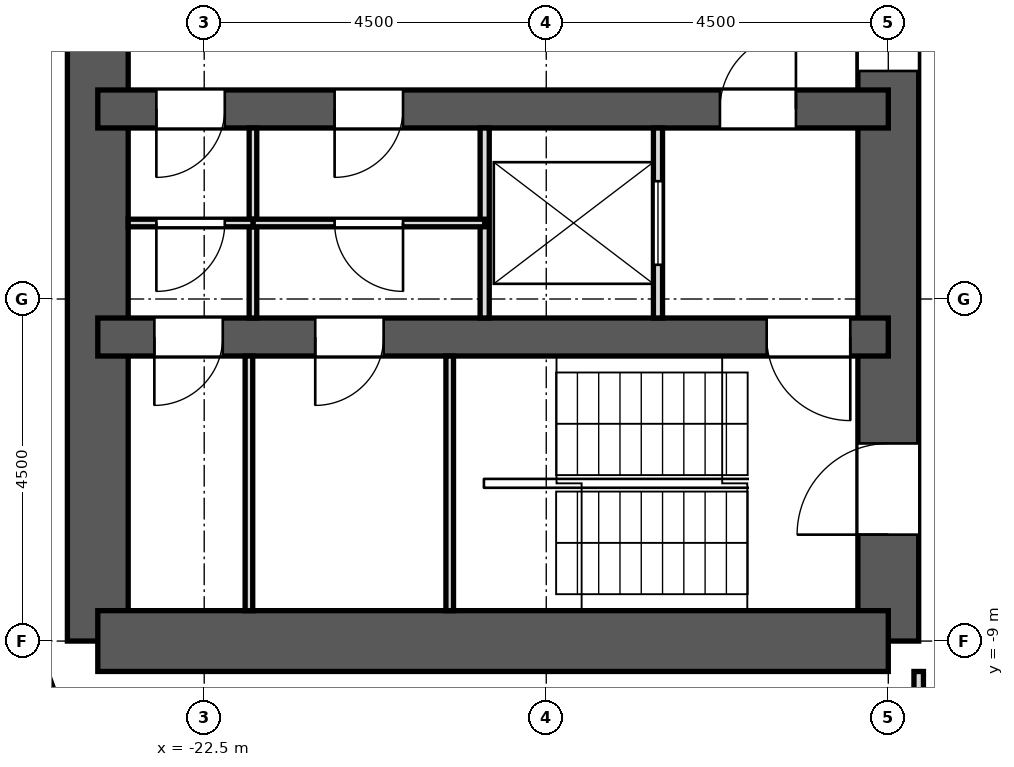
"""IFC4 building model, lengths in metres.
Left out: names, types, materials, properties, quantities, classifications, styles, units other than length and angle.
Written with IfcOpenShell. Run it as: python <this file> out.ifc"""

import sys

from ifc_helpers import new_model, si_unit, direction, frame, frame_2d, origin, place, context, subcontext, project, spatial, rectangle, extrude, element, fill, save


model = new_model("IFC4")
c1 = context("Model", 3, precision=1e-05, world=origin(), true_north=direction((0.0, 1.0)))
c2 = subcontext(c1, "Body", "Model", "MODEL_VIEW")
j1 = project(units=[si_unit("LENGTHUNIT", "METRE"), si_unit("PLANEANGLEUNIT", "RADIAN")], contexts=[c1])
p1 = place(None, origin())
s1 = spatial("IfcSite", under=j1, at=p1, CompositionType="ELEMENT")
p2 = place(p1, origin())
s2 = spatial("IfcBuilding", under=s1, at=p2, CompositionType="ELEMENT")
p3 = place(p2, frame((0.0, 0.0, 131.5)))
s3 = spatial("IfcBuildingStorey", under=s2, at=p3, CompositionType="ELEMENT", Elevation=131.5)
p4 = place(p3, frame((-13.5, -9.0, 0.0), z_axis=(0.0, 0.0, 1.0), x_axis=(0.0, 1.0, 0.0)))
e1 = element("IfcWall", 1, at=p4, inside=s3, PredefinedType="SHEAR", context=c2, shape_type="SweptSolid", body=[
    extrude(rectangle(XDim=18.0, YDim=0.8, at=frame_2d((9.0, 0.0))), origin(), (0.0, 0.0, 1.0), 3.3),
])
p5 = place(p4, frame((15.4, 0.0, 0.0)))
e2 = element("IfcOpeningElement", 2, at=p5, cuts=e1, PredefinedType="OPENING", context=c2, shape_type="SweptSolid", body=[
    extrude(rectangle(XDim=1.2, YDim=2.1, at=frame_2d((0.6, 1.05))), frame((0.0, 0.412, 0.0), z_axis=(0.0, -1.0, 0.0), x_axis=(1.0, 0.0, 0.0)), (0.0, 0.0, 1.0), 0.824),
])
p6 = place(p4, frame((1.4, 0.0, 0.0)))
e3 = element("IfcOpeningElement", 3, at=p6, cuts=e1, PredefinedType="OPENING", context=c2, shape_type="SweptSolid", body=[
    extrude(rectangle(XDim=1.2, YDim=2.1, at=frame_2d((0.6, 1.05))), frame((0.0, 0.412, 0.0), z_axis=(0.0, -1.0, 0.0), x_axis=(1.0, 0.0, 0.0)), (0.0, 0.0, 1.0), 0.824),
])
p7 = place(p4, frame((7.5, 0.0, 0.0)))
e4 = element("IfcOpeningElement", 4, at=p7, cuts=e1, PredefinedType="OPENING", context=c2, shape_type="SweptSolid", body=[
    extrude(rectangle(XDim=3.0, YDim=2.4, at=frame_2d((1.5, 1.2))), frame((0.0, 0.412, 0.0), z_axis=(0.0, -1.0, 0.0), x_axis=(1.0, 0.0, 0.0)), (0.0, 0.0, 1.0), 0.824),
])
p8 = place(p3, frame((-23.9, -9.0, 0.0), z_axis=(0.0, 0.0, 1.0), x_axis=(0.0, 1.0, 0.0)))
e5 = element("IfcWall", 5, at=p8, inside=s3, PredefinedType="SHEAR", context=c2, shape_type="SweptSolid", body=[
    extrude(rectangle(XDim=18.0, YDim=0.8, at=frame_2d((9.0, 0.0))), origin(), (0.0, 0.0, 1.0), 3.3),
])
p9 = place(p3, frame((-13.5, -9.0, 0.0), z_axis=(0.0, 0.0, 1.0), x_axis=(-1.0, 0.0, 0.0)))
e6 = element("IfcWall", 6, at=p9, inside=s3, PredefinedType="SHEAR", context=c2, shape_type="SweptSolid", body=[
    extrude(rectangle(XDim=10.4, YDim=0.8, at=frame_2d((5.2, 0.0))), origin(), (0.0, 0.0, 1.0), 3.3),
])
p10 = place(p3, frame((-13.5, -5.0, 0.0), z_axis=(0.0, 0.0, 1.0), x_axis=(-1.0, 0.0, 0.0)))
e7 = element("IfcWall", 7, at=p10, inside=s3, PredefinedType="SHEAR", context=c2, shape_type="SweptSolid", body=[
    extrude(rectangle(XDim=10.4, YDim=0.5, at=frame_2d((5.2, 0.0))), origin(), (0.0, 0.0, 1.0), 3.3),
])
p11 = place(p10, frame((6.639, 0.0, 0.0)))
e8 = element("IfcOpeningElement", 8, at=p11, cuts=e7, PredefinedType="OPENING", context=c2, shape_type="SweptSolid", body=[
    extrude(rectangle(XDim=0.9, YDim=2.1, at=frame_2d((0.45, 1.05))), frame((0.0, 0.262, 0.0), z_axis=(0.0, -1.0, 0.0), x_axis=(1.0, 0.0, 0.0)), (0.0, 0.0, 1.0), 0.524),
])
p12 = place(p10, frame((8.756, 0.0, 0.0)))
e9 = element("IfcOpeningElement", 9, at=p12, cuts=e7, PredefinedType="OPENING", context=c2, shape_type="SweptSolid", body=[
    extrude(rectangle(XDim=0.9, YDim=2.1, at=frame_2d((0.45, 1.05))), frame((0.0, 0.262, 0.0), z_axis=(0.0, -1.0, 0.0), x_axis=(1.0, 0.0, 0.0)), (0.0, 0.0, 1.0), 0.524),
])
p13 = place(p10, frame((0.5, 0.0, 0.0)))
e10 = element("IfcOpeningElement", 10, at=p13, cuts=e7, PredefinedType="OPENING", context=c2, shape_type="SweptSolid", body=[
    extrude(rectangle(XDim=1.1, YDim=2.1, at=frame_2d((0.55, 1.05))), frame((0.0, 0.262, 0.0), z_axis=(0.0, -1.0, 0.0), x_axis=(1.0, 0.0, 0.0)), (0.0, 0.0, 1.0), 0.524),
])
p14 = place(p3, frame((-13.5, -2.0, 0.0), z_axis=(0.0, 0.0, 1.0), x_axis=(-1.0, 0.0, 0.0)))
e11 = element("IfcWall", 11, at=p14, inside=s3, PredefinedType="SHEAR", context=c2, shape_type="SweptSolid", body=[
    extrude(rectangle(XDim=10.4, YDim=0.5, at=frame_2d((5.2, 0.0))), origin(), (0.0, 0.0, 1.0), 3.3),
])
p15 = place(p14, frame((1.215, 0.0, 0.0)))
e12 = element("IfcOpeningElement", 12, at=p15, cuts=e11, PredefinedType="OPENING", context=c2, shape_type="SweptSolid", body=[
    extrude(rectangle(XDim=1.0, YDim=2.1, at=frame_2d((0.5, 1.05))), frame((0.0, 0.262, 0.0), z_axis=(0.0, -1.0, 0.0), x_axis=(1.0, 0.0, 0.0)), (0.0, 0.0, 1.0), 0.524),
])
p16 = place(p14, frame((6.384, 0.0, 0.0)))
e13 = element("IfcOpeningElement", 13, at=p16, cuts=e11, PredefinedType="OPENING", context=c2, shape_type="SweptSolid", body=[
    extrude(rectangle(XDim=0.9, YDim=2.1, at=frame_2d((0.45, 1.05))), frame((0.0, 0.262, 0.0), z_axis=(0.0, -1.0, 0.0), x_axis=(1.0, 0.0, 0.0)), (0.0, 0.0, 1.0), 0.524),
])
p17 = place(p14, frame((8.729, 0.0, 0.0)))
e14 = element("IfcOpeningElement", 14, at=p17, cuts=e11, PredefinedType="OPENING", context=c2, shape_type="SweptSolid", body=[
    extrude(rectangle(XDim=0.9, YDim=2.1, at=frame_2d((0.45, 1.05))), frame((0.0, 0.262, 0.0), z_axis=(0.0, -1.0, 0.0), x_axis=(1.0, 0.0, 0.0)), (0.0, 0.0, 1.0), 0.524),
])
p18 = place(p3, frame((-25.617, -7.383, 0.0), z_axis=(0.0, 0.0, 1.0), x_axis=(0.341990236633, -0.939703505393, 0.0)))
e15 = element("IfcWall", 15, at=p18, inside=s3, PredefinedType="SOLIDWALL", context=c2, shape_type="SweptSolid", body=[
    extrude(rectangle(XDim=3.648, YDim=0.6, at=frame_2d((1.824, 0.0))), origin(), (0.0, 0.0, 1.0), 2.8),
])
p19 = place(p3, frame((-13.1, -13.037, 0.0), z_axis=(0.0, 0.0, 1.0), x_axis=(0.0, 1.0, 0.0)))
e16 = element("IfcWall", 16, at=p19, inside=s3, PredefinedType="PARTITIONING", context=c2, shape_type="SweptSolid", body=[
    extrude(rectangle(XDim=3.637, YDim=0.125, at=frame_2d((1.818, 0.0))), origin(), (0.0, 0.0, 1.0), 2.8),
])
p20 = place(p3, frame((-16.53, -4.75, 0.0), z_axis=(0.0, 0.0, 1.0), x_axis=(0.0, 1.0, 0.0)))
e17 = element("IfcWall", 17, at=p20, inside=s3, PredefinedType="PARTITIONING", context=c2, shape_type="SweptSolid", body=[
    extrude(rectangle(XDim=2.5, YDim=0.12, at=frame_2d((1.25, 0.0))), origin(), (0.0, 0.0, 1.0), 2.8),
])
p21 = place(p20, frame((0.7, 0.0, 0.0)))
e18 = element("IfcOpeningElement", 18, at=p21, cuts=e17, PredefinedType="OPENING", context=c2, shape_type="SweptSolid", body=[
    extrude(rectangle(XDim=1.1, YDim=2.1, at=frame_2d((0.55, 1.05))), frame((0.0, 0.072, 0.0), z_axis=(0.0, -1.0, 0.0), x_axis=(1.0, 0.0, 0.0)), (0.0, 0.0, 1.0), 0.144),
])
p22 = place(p3, frame((-18.81, -4.75, 0.0), z_axis=(0.0, 0.0, 1.0), x_axis=(0.0, 1.0, 0.0)))
e19 = element("IfcWall", 19, at=p22, inside=s3, PredefinedType="PARTITIONING", context=c2, shape_type="SweptSolid", body=[
    extrude(rectangle(XDim=2.5, YDim=0.12, at=frame_2d((1.25, 0.0))), origin(), (0.0, 0.0, 1.0), 2.8),
])
p23 = place(p3, frame((-21.858, -4.75, 0.0), z_axis=(0.0, 0.0, 1.0), x_axis=(0.0, 1.0, 0.0)))
e20 = element("IfcWall", 20, at=p23, inside=s3, PredefinedType="PARTITIONING", context=c2, shape_type="SweptSolid", body=[
    extrude(rectangle(XDim=2.5, YDim=0.1, at=frame_2d((1.25, 0.0))), origin(), (0.0, 0.0, 1.0), 2.8),
])
p24 = place(p3, frame((-18.81, -3.5, 0.0), z_axis=(0.0, 0.0, 1.0), x_axis=(-1.0, 0.0, 0.0)))
e21 = element("IfcWall", 21, at=p24, inside=s3, PredefinedType="PARTITIONING", context=c2, shape_type="SweptSolid", body=[
    extrude(rectangle(XDim=3.048, YDim=0.1, at=frame_2d((1.524, 0.0))), origin(), (0.0, 0.0, 1.0), 2.8),
])
p25 = place(p24, frame((1.074, 0.0, 0.0)))
e22 = element("IfcOpeningElement", 22, at=p25, cuts=e21, PredefinedType="OPENING", context=c2, shape_type="SweptSolid", body=[
    extrude(rectangle(XDim=0.9, YDim=2.1, at=frame_2d((0.45, 1.05))), frame((0.0, 0.062, 0.0), z_axis=(0.0, -1.0, 0.0), x_axis=(1.0, 0.0, 0.0)), (0.0, 0.0, 1.0), 0.124),
])
p26 = place(p3, frame((-21.858, -3.5, 0.0), z_axis=(0.0, 0.0, 1.0), x_axis=(-1.0, 0.0, 0.0)))
e23 = element("IfcWall", 23, at=p26, inside=s3, PredefinedType="PARTITIONING", context=c2, shape_type="SweptSolid", body=[
    extrude(rectangle(XDim=1.642, YDim=0.1, at=frame_2d((0.821, 0.0))), origin(), (0.0, 0.0, 1.0), 2.8),
])
p27 = place(p26, frame((0.371, 0.0, 0.0)))
e24 = element("IfcOpeningElement", 24, at=p27, cuts=e23, PredefinedType="OPENING", context=c2, shape_type="SweptSolid", body=[
    extrude(rectangle(XDim=0.9, YDim=2.1, at=frame_2d((0.45, 1.05))), frame((0.0, 0.062, 0.0), z_axis=(0.0, -1.0, 0.0), x_axis=(1.0, 0.0, 0.0)), (0.0, 0.0, 1.0), 0.124),
])
for number, where, z_axis, x_axis in (
    (25, (-19.27, -8.6, 0.0), (0.0, 0.0, 1.0), (0.0, 1.0, 0.0)),
    (26, (-21.912, -8.6, 0.0), (0.0, 0.0, 1.0), (0.0, 1.0, 0.0)),
):
    element("IfcWall", number, at=place(p3, frame(where, z_axis=z_axis, x_axis=x_axis)), inside=s3, PredefinedType="PARTITIONING", context=c2, shape_type="SweptSolid", body=[
        extrude(rectangle(XDim=3.35, YDim=0.1, at=frame_2d((1.675, 0.0))), origin(), (0.0, 0.0, 1.0), 2.8),
    ])
p28 = place(p21, origin())
e27 = element("IfcDoor", 27, at=p28, inside=s3, OperationType="DOUBLE_DOOR_SLIDING", PredefinedType="DOOR", context=c2, shape_type="SweptSolid", body=[
    extrude(rectangle(XDim=1.1, YDim=2.1, at=frame_2d((0.55, 1.05))), frame((0.0, 0.025, 0.0), z_axis=(0.0, -1.0, 0.0), x_axis=(1.0, 0.0, 0.0)), (0.0, 0.0, 1.0), 0.05),
])
fill(e18, e27)
p29 = place(p15, frame((1.0, 0.0, 0.0), z_axis=(0.0, 0.0, 1.0), x_axis=(-1.0, 0.0, 0.0)))
e28 = element("IfcDoor", 28, at=p29, inside=s3, OperationType="SINGLE_SWING_RIGHT", PredefinedType="DOOR", context=c2, shape_type="SweptSolid", body=[
    extrude(rectangle(XDim=1.0, YDim=2.1, at=frame_2d((0.5, 1.05))), frame((0.0, 0.025, 0.0), z_axis=(0.0, -1.0, 0.0), x_axis=(1.0, 0.0, 0.0)), (0.0, 0.0, 1.0), 0.05),
])
fill(e12, e28)
p30 = place(p16, origin())
e29 = element("IfcDoor", 29, at=p30, inside=s3, OperationType="SINGLE_SWING_RIGHT", PredefinedType="DOOR", context=c2, shape_type="SweptSolid", body=[
    extrude(rectangle(XDim=0.9, YDim=2.1, at=frame_2d((0.45, 1.05))), frame((0.0, 0.025, 0.0), z_axis=(0.0, -1.0, 0.0), x_axis=(1.0, 0.0, 0.0)), (0.0, 0.0, 1.0), 0.05),
])
fill(e13, e29)
p31 = place(p17, origin())
e30 = element("IfcDoor", 30, at=p31, inside=s3, OperationType="SINGLE_SWING_RIGHT", PredefinedType="DOOR", context=c2, shape_type="SweptSolid", body=[
    extrude(rectangle(XDim=0.9, YDim=2.1, at=frame_2d((0.45, 1.05))), frame((0.0, 0.025, 0.0), z_axis=(0.0, -1.0, 0.0), x_axis=(1.0, 0.0, 0.0)), (0.0, 0.0, 1.0), 0.05),
])
fill(e14, e30)
p32 = place(p27, origin())
e31 = element("IfcDoor", 31, at=p32, inside=s3, OperationType="SINGLE_SWING_RIGHT", PredefinedType="DOOR", context=c2, shape_type="SweptSolid", body=[
    extrude(rectangle(XDim=0.9, YDim=2.1, at=frame_2d((0.45, 1.05))), frame((0.0, 0.025, 0.0), z_axis=(0.0, -1.0, 0.0), x_axis=(1.0, 0.0, 0.0)), (0.0, 0.0, 1.0), 0.05),
])
fill(e24, e31)
p33 = place(p25, origin())
e32 = element("IfcDoor", 32, at=p33, inside=s3, OperationType="SINGLE_SWING_LEFT", PredefinedType="DOOR", context=c2, shape_type="SweptSolid", body=[
    extrude(rectangle(XDim=0.9, YDim=2.1, at=frame_2d((0.45, 1.05))), frame((0.0, 0.025, 0.0), z_axis=(0.0, -1.0, 0.0), x_axis=(1.0, 0.0, 0.0)), (0.0, 0.0, 1.0), 0.05),
])
fill(e22, e32)
p34 = place(p11, origin())
e33 = element("IfcDoor", 33, at=p34, inside=s3, OperationType="SINGLE_SWING_RIGHT", PredefinedType="DOOR", context=c2, shape_type="SweptSolid", body=[
    extrude(rectangle(XDim=0.9, YDim=2.1, at=frame_2d((0.45, 1.05))), frame((0.0, 0.025, 0.0), z_axis=(0.0, -1.0, 0.0), x_axis=(1.0, 0.0, 0.0)), (0.0, 0.0, 1.0), 0.05),
])
fill(e8, e33)
p35 = place(p12, origin())
e34 = element("IfcDoor", 34, at=p35, inside=s3, OperationType="SINGLE_SWING_RIGHT", PredefinedType="DOOR", context=c2, shape_type="SweptSolid", body=[
    extrude(rectangle(XDim=0.9, YDim=2.1, at=frame_2d((0.45, 1.05))), frame((0.0, 0.025, 0.0), z_axis=(0.0, -1.0, 0.0), x_axis=(1.0, 0.0, 0.0)), (0.0, 0.0, 1.0), 0.05),
])
fill(e9, e34)
p36 = place(p13, origin())
e35 = element("IfcDoor", 35, at=p36, inside=s3, OperationType="SINGLE_SWING_LEFT", PredefinedType="DOOR", context=c2, shape_type="SweptSolid", body=[
    extrude(rectangle(XDim=1.1, YDim=2.1, at=frame_2d((0.55, 1.05))), frame((0.0, 0.025, 0.0), z_axis=(0.0, -1.0, 0.0), x_axis=(1.0, 0.0, 0.0)), (0.0, 0.0, 1.0), 0.05),
])
fill(e10, e35)
p37 = place(p6, origin())
e36 = element("IfcDoor", 36, at=p37, inside=s3, OperationType="SINGLE_SWING_LEFT", PredefinedType="DOOR", context=c2, shape_type="SweptSolid", body=[
    extrude(rectangle(XDim=1.2, YDim=2.1, at=frame_2d((0.6, 1.05))), frame((0.0, 0.025, 0.0), z_axis=(0.0, -1.0, 0.0), x_axis=(1.0, 0.0, 0.0)), (0.0, 0.0, 1.0), 0.05),
])
fill(e3, e36)
p38 = place(p7, origin())
e37 = element("IfcDoor", 37, at=p38, inside=s3, OperationType="DOUBLE_DOOR_SLIDING", PredefinedType="DOOR", context=c2, shape_type="SweptSolid", body=[
    extrude(rectangle(XDim=3.0, YDim=2.4, at=frame_2d((1.5, 1.2))), frame((0.0, 0.025, 0.0), z_axis=(0.0, -1.0, 0.0), x_axis=(1.0, 0.0, 0.0)), (0.0, 0.0, 1.0), 0.05),
])
fill(e4, e37)
save(model, sys.argv[1])
